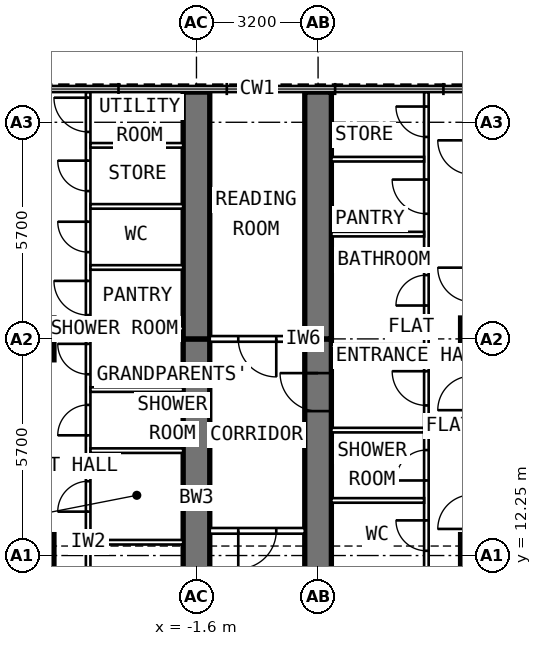
"""IFC4 building model, lengths in metres.
Left out: names, types, materials, properties, quantities, classifications, styles, units other than length and angle.
Written with IfcOpenShell. Run it as: python <this file> out.ifc"""

import sys

from ifc_helpers import new_model, si_unit, direction, frame, frame_2d, origin, origin_2d, place, context, subcontext, project, spatial, rectangle, extrude, element, fill, save


model = new_model("IFC4")
c1 = context("Model", 3, precision=1e-05, world=origin(), true_north=direction((0.0, 1.0)))
c2 = subcontext(c1, "Body", "Model", "MODEL_VIEW")
j1 = project(units=[si_unit("LENGTHUNIT", "METRE"), si_unit("PLANEANGLEUNIT", "RADIAN")], contexts=[c1])
p1 = place(None, origin())
s1 = spatial("IfcSite", under=j1, at=p1, CompositionType="ELEMENT")
p2 = place(p1, origin())
s2 = spatial("IfcBuilding", under=s1, at=p2, CompositionType="ELEMENT")
p3 = place(p2, frame((0.0, 0.0, 219.0)))
s3 = spatial("IfcBuildingStorey", under=s2, at=p3, CompositionType="ELEMENT", Elevation=219.0)
for number, where, z_axis, x_axis in (
    (1, (-5.9, 12.25, 0.0), (0.0, 0.0, 1.0), (0.0, 1.0, 0.0)),
    (2, (-5.9, 17.95, 0.0), (0.0, 0.0, 1.0), (0.0, 1.0, 0.0)),
    (3, (5.9, 12.25, 0.0), (0.0, 0.0, 1.0), (0.0, 1.0, 0.0)),
    (4, (5.9, 17.95, 0.0), (0.0, 0.0, 1.0), (0.0, 1.0, 0.0)),
):
    element("IfcColumn", number, at=place(p3, frame(where, z_axis=z_axis, x_axis=x_axis)), inside=s3, PredefinedType="COLUMN", context=c2, shape_type="SweptSolid", body=[
        extrude(rectangle(XDim=1.1, YDim=1.1, at=origin_2d()), origin(), (0.0, 0.0, 1.0), 3.6),
    ])
p4 = place(p3, frame((-1.6, 9.6, 0.0), z_axis=(0.0, 0.0, 1.0), x_axis=(0.0, 1.0, 0.0)))
e5 = element("IfcWall", 5, at=p4, inside=s3, PredefinedType="SHEAR", context=c2, shape_type="SweptSolid", body=[
    extrude(rectangle(XDim=8.35, YDim=0.7, at=frame_2d((4.175, 0.0))), origin(), (0.0, 0.0, 1.0), 3.6),
])
p5 = place(p4, frame((1.3, 0.0, 0.0)))
e6 = element("IfcOpeningElement", 6, at=p5, cuts=e5, PredefinedType="OPENING", context=c2, shape_type="SweptSolid", body=[
    extrude(rectangle(XDim=1.0, YDim=2.1, at=frame_2d((0.5, 1.05))), frame((0.0, 0.362, 0.0), z_axis=(0.0, -1.0, 0.0), x_axis=(1.0, 0.0, 0.0)), (0.0, 0.0, 1.0), 0.724),
])
p6 = place(p3, frame((-1.6, 17.95, 0.0), z_axis=(0.0, 0.0, 1.0), x_axis=(0.0, 1.0, 0.0)))
e7 = element("IfcWall", 7, at=p6, inside=s3, PredefinedType="SHEAR", context=c2, shape_type="SweptSolid", body=[
    extrude(rectangle(XDim=6.495, YDim=0.7, at=frame_2d((3.248, 0.0))), origin(), (0.0, 0.0, 1.0), 3.6),
])
p7 = place(p3, frame((1.6, 9.6, 0.0), z_axis=(0.0, 0.0, 1.0), x_axis=(0.0, 1.0, 0.0)))
e8 = element("IfcWall", 8, at=p7, inside=s3, PredefinedType="SHEAR", context=c2, shape_type="SweptSolid", body=[
    extrude(rectangle(XDim=8.35, YDim=0.7, at=frame_2d((4.175, 0.0))), origin(), (0.0, 0.0, 1.0), 3.6),
])
p8 = place(p7, frame((6.45, 0.0, 0.0)))
e9 = element("IfcOpeningElement", 9, at=p8, cuts=e8, PredefinedType="OPENING", context=c2, shape_type="SweptSolid", body=[
    extrude(rectangle(XDim=1.0, YDim=2.1, at=frame_2d((0.5, 1.05))), frame((0.0, 0.362, 0.0), z_axis=(0.0, -1.0, 0.0), x_axis=(1.0, 0.0, 0.0)), (0.0, 0.0, 1.0), 0.724),
])
p9 = place(p3, frame((1.6, 17.95, 0.0), z_axis=(0.0, 0.0, 1.0), x_axis=(0.0, 1.0, 0.0)))
e10 = element("IfcWall", 10, at=p9, inside=s3, PredefinedType="SHEAR", context=c2, shape_type="SweptSolid", body=[
    extrude(rectangle(XDim=6.495, YDim=0.7, at=frame_2d((3.248, 0.0))), origin(), (0.0, 0.0, 1.0), 3.6),
])
p10 = place(p3, frame((-4.45, 9.925, 0.0), z_axis=(0.0, 0.0, 1.0), x_axis=(0.0, 1.0, 0.0)))
e11 = element("IfcWall", 11, at=p10, inside=s3, PredefinedType="PARTITIONING", context=c2, shape_type="SweptSolid", body=[
    extrude(rectangle(XDim=14.52, YDim=0.12, at=frame_2d((7.26, 0.0))), origin(), (0.0, 0.0, 1.0), 3.35),
])
p11 = place(p10, frame((0.925, 0.0, 0.0)))
e12 = element("IfcOpeningElement", 12, at=p11, cuts=e11, PredefinedType="OPENING", context=c2, shape_type="SweptSolid", body=[
    extrude(rectangle(XDim=0.9, YDim=2.1, at=frame_2d((0.45, 1.05))), frame((0.0, 0.072, 0.0), z_axis=(0.0, -1.0, 0.0), x_axis=(1.0, 0.0, 0.0)), (0.0, 0.0, 1.0), 0.144),
])
p12 = place(p10, frame((3.48, 0.0, 0.0)))
e13 = element("IfcOpeningElement", 13, at=p12, cuts=e11, PredefinedType="OPENING", context=c2, shape_type="SweptSolid", body=[
    extrude(rectangle(XDim=0.8, YDim=2.1, at=frame_2d((0.4, 1.05))), frame((0.0, 0.072, 0.0), z_axis=(0.0, -1.0, 0.0), x_axis=(1.0, 0.0, 0.0)), (0.0, 0.0, 1.0), 0.144),
])
p13 = place(p10, frame((5.488, 0.0, 0.0)))
e14 = element("IfcOpeningElement", 14, at=p13, cuts=e11, PredefinedType="OPENING", context=c2, shape_type="SweptSolid", body=[
    extrude(rectangle(XDim=0.8, YDim=2.1, at=frame_2d((0.4, 1.05))), frame((0.0, 0.072, 0.0), z_axis=(0.0, -1.0, 0.0), x_axis=(1.0, 0.0, 0.0)), (0.0, 0.0, 1.0), 0.144),
])
p14 = place(p10, frame((7.095, 0.0, 0.0)))
e15 = element("IfcOpeningElement", 15, at=p14, cuts=e11, PredefinedType="OPENING", context=c2, shape_type="SweptSolid", body=[
    extrude(rectangle(XDim=0.8, YDim=2.1, at=frame_2d((0.4, 1.05))), frame((0.0, 0.072, 0.0), z_axis=(0.0, -1.0, 0.0), x_axis=(1.0, 0.0, 0.0)), (0.0, 0.0, 1.0), 0.144),
])
p15 = place(p10, frame((8.652, 0.0, 0.0)))
e16 = element("IfcOpeningElement", 16, at=p15, cuts=e11, PredefinedType="OPENING", context=c2, shape_type="SweptSolid", body=[
    extrude(rectangle(XDim=0.9, YDim=2.1, at=frame_2d((0.45, 1.05))), frame((0.0, 0.072, 0.0), z_axis=(0.0, -1.0, 0.0), x_axis=(1.0, 0.0, 0.0)), (0.0, 0.0, 1.0), 0.144),
])
p16 = place(p10, frame((10.308, 0.0, 0.0)))
e17 = element("IfcOpeningElement", 17, at=p16, cuts=e11, PredefinedType="OPENING", context=c2, shape_type="SweptSolid", body=[
    extrude(rectangle(XDim=0.8, YDim=2.1, at=frame_2d((0.4, 1.05))), frame((0.0, 0.072, 0.0), z_axis=(0.0, -1.0, 0.0), x_axis=(1.0, 0.0, 0.0)), (0.0, 0.0, 1.0), 0.144),
])
p17 = place(p10, frame((11.915, 0.0, 0.0)))
e18 = element("IfcOpeningElement", 18, at=p17, cuts=e11, PredefinedType="OPENING", context=c2, shape_type="SweptSolid", body=[
    extrude(rectangle(XDim=0.8, YDim=2.1, at=frame_2d((0.4, 1.05))), frame((0.0, 0.072, 0.0), z_axis=(0.0, -1.0, 0.0), x_axis=(1.0, 0.0, 0.0)), (0.0, 0.0, 1.0), 0.144),
])
p18 = place(p10, frame((13.472, 0.0, 0.0)))
e19 = element("IfcOpeningElement", 19, at=p18, cuts=e11, PredefinedType="OPENING", context=c2, shape_type="SweptSolid", body=[
    extrude(rectangle(XDim=0.9, YDim=2.1, at=frame_2d((0.45, 1.05))), frame((0.0, 0.072, 0.0), z_axis=(0.0, -1.0, 0.0), x_axis=(1.0, 0.0, 0.0)), (0.0, 0.0, 1.0), 0.144),
])
p19 = place(p3, frame((-1.95, 12.6, 0.0), z_axis=(0.0, 0.0, 1.0), x_axis=(-1.0, 0.0, 0.0)))
e20 = element("IfcWall", 20, at=p19, inside=s3, PredefinedType="PARTITIONING", context=c2, shape_type="SweptSolid", body=[
    extrude(rectangle(XDim=2.44, YDim=0.12, at=frame_2d((1.22, 0.0))), origin(), (0.0, 0.0, 1.0), 2.45),
])
for number, where, z_axis, x_axis in (
    (21, (-1.95, 15.01, 0.0), (0.0, 0.0, 1.0), (-1.0, 0.0, 0.0)),
    (22, (-1.95, 16.617, 0.0), (0.0, 0.0, 1.0), (-1.0, 0.0, 0.0)),
):
    element("IfcWall", number, at=place(p3, frame(where, z_axis=z_axis, x_axis=x_axis)), inside=s3, PredefinedType="PARTITIONING", context=c2, shape_type="SweptSolid", body=[
        extrude(rectangle(XDim=2.44, YDim=0.12, at=frame_2d((1.22, 0.0))), origin(), (0.0, 0.0, 1.0), 3.35),
    ])
p20 = place(p3, frame((-1.95, 18.223, 0.0), z_axis=(0.0, 0.0, 1.0), x_axis=(-1.0, 0.0, 0.0)))
e23 = element("IfcWall", 23, at=p20, inside=s3, PredefinedType="PARTITIONING", context=c2, shape_type="SweptSolid", body=[
    extrude(rectangle(XDim=2.44, YDim=0.12, at=frame_2d((1.22, 0.0))), origin(), (0.0, 0.0, 1.0), 2.45),
])
for number, where, z_axis, x_axis in (
    (24, (-1.95, 19.83, 0.0), (0.0, 0.0, 1.0), (-1.0, 0.0, 0.0)),
    (25, (-1.95, 21.437, 0.0), (0.0, 0.0, 1.0), (-1.0, 0.0, 0.0)),
    (26, (-1.95, 23.043, 0.0), (0.0, 0.0, 1.0), (-1.0, 0.0, 0.0)),
):
    element("IfcWall", number, at=place(p3, frame(where, z_axis=z_axis, x_axis=x_axis)), inside=s3, PredefinedType="PARTITIONING", context=c2, shape_type="SweptSolid", body=[
        extrude(rectangle(XDim=2.44, YDim=0.12, at=frame_2d((1.22, 0.0))), origin(), (0.0, 0.0, 1.0), 3.35),
    ])
p21 = place(p3, frame((4.45, 9.925, 0.0), z_axis=(0.0, 0.0, 1.0), x_axis=(0.0, 1.0, 0.0)))
e27 = element("IfcWall", 27, at=p21, inside=s3, PredefinedType="PARTITIONING", context=c2, shape_type="SweptSolid", body=[
    extrude(rectangle(XDim=14.52, YDim=0.12, at=frame_2d((7.26, 0.0))), origin(), (0.0, 0.0, 1.0), 3.35),
])
p22 = place(p21, frame((0.55, 0.0, 0.0)))
e28 = element("IfcOpeningElement", 28, at=p22, cuts=e27, PredefinedType="OPENING", context=c2, shape_type="SweptSolid", body=[
    extrude(rectangle(XDim=0.9, YDim=2.1, at=frame_2d((0.45, 1.05))), frame((0.0, 0.072, 0.0), z_axis=(0.0, -1.0, 0.0), x_axis=(1.0, 0.0, 0.0)), (0.0, 0.0, 1.0), 0.144),
])
p23 = place(p21, frame((2.45, 0.0, 0.0)))
e29 = element("IfcOpeningElement", 29, at=p23, cuts=e27, PredefinedType="OPENING", context=c2, shape_type="SweptSolid", body=[
    extrude(rectangle(XDim=0.8, YDim=2.1, at=frame_2d((0.4, 1.05))), frame((0.0, 0.072, 0.0), z_axis=(0.0, -1.0, 0.0), x_axis=(1.0, 0.0, 0.0)), (0.0, 0.0, 1.0), 0.144),
])
p24 = place(p21, frame((4.3, 0.0, 0.0)))
e30 = element("IfcOpeningElement", 30, at=p24, cuts=e27, PredefinedType="OPENING", context=c2, shape_type="SweptSolid", body=[
    extrude(rectangle(XDim=0.8, YDim=2.1, at=frame_2d((0.4, 1.05))), frame((0.0, 0.072, 0.0), z_axis=(0.0, -1.0, 0.0), x_axis=(1.0, 0.0, 0.0)), (0.0, 0.0, 1.0), 0.144),
])
p25 = place(p21, frame((6.275, 0.0, 0.0)))
e31 = element("IfcOpeningElement", 31, at=p25, cuts=e27, PredefinedType="OPENING", context=c2, shape_type="SweptSolid", body=[
    extrude(rectangle(XDim=0.9, YDim=2.1, at=frame_2d((0.45, 1.05))), frame((0.0, 0.072, 0.0), z_axis=(0.0, -1.0, 0.0), x_axis=(1.0, 0.0, 0.0)), (0.0, 0.0, 1.0), 0.144),
])
p26 = place(p21, frame((8.904, 0.0, 0.0)))
e32 = element("IfcOpeningElement", 32, at=p26, cuts=e27, PredefinedType="OPENING", context=c2, shape_type="SweptSolid", body=[
    extrude(rectangle(XDim=0.8, YDim=2.1, at=frame_2d((0.4, 1.05))), frame((0.0, 0.072, 0.0), z_axis=(0.0, -1.0, 0.0), x_axis=(1.0, 0.0, 0.0)), (0.0, 0.0, 1.0), 0.144),
])
p27 = place(p21, frame((11.318, 0.0, 0.0)))
e33 = element("IfcOpeningElement", 33, at=p27, cuts=e27, PredefinedType="OPENING", context=c2, shape_type="SweptSolid", body=[
    extrude(rectangle(XDim=0.9, YDim=2.1, at=frame_2d((0.45, 1.05))), frame((0.0, 0.072, 0.0), z_axis=(0.0, -1.0, 0.0), x_axis=(1.0, 0.0, 0.0)), (0.0, 0.0, 1.0), 0.144),
])
p28 = place(p21, frame((13.339, 0.0, 0.0)))
e34 = element("IfcOpeningElement", 34, at=p28, cuts=e27, PredefinedType="OPENING", context=c2, shape_type="SweptSolid", body=[
    extrude(rectangle(XDim=0.8, YDim=2.1, at=frame_2d((0.4, 1.05))), frame((0.0, 0.072, 0.0), z_axis=(0.0, -1.0, 0.0), x_axis=(1.0, 0.0, 0.0)), (0.0, 0.0, 1.0), 0.144),
])
for number, where, z_axis, x_axis in (
    (35, (1.95, 13.7, 0.0), (0.0, 0.0, 1.0), (1.0, 0.0, 0.0)),
    (36, (1.95, 15.55, 0.0), (0.0, 0.0, 1.0), (1.0, 0.0, 0.0)),
):
    element("IfcWall", number, at=place(p3, frame(where, z_axis=z_axis, x_axis=x_axis)), inside=s3, PredefinedType="PARTITIONING", context=c2, shape_type="SweptSolid", body=[
        extrude(rectangle(XDim=2.44, YDim=0.12, at=frame_2d((1.22, 0.0))), origin(), (0.0, 0.0, 1.0), 3.35),
    ])
p29 = place(p3, frame((1.95, 17.75, 0.0), z_axis=(0.0, 0.0, 1.0), x_axis=(1.0, 0.0, 0.0)))
e37 = element("IfcWall", 37, at=p29, inside=s3, PredefinedType="PARTITIONING", context=c2, shape_type="SweptSolid", body=[
    extrude(rectangle(XDim=2.44, YDim=0.12, at=frame_2d((1.22, 0.0))), origin(), (0.0, 0.0, 1.0), 2.45),
])
for number, where, z_axis, x_axis in (
    (38, (1.95, 20.707, 0.0), (0.0, 0.0, 1.0), (1.0, 0.0, 0.0)),
    (39, (1.95, 22.678, 0.0), (0.0, 0.0, 1.0), (1.0, 0.0, 0.0)),
):
    element("IfcWall", number, at=place(p3, frame(where, z_axis=z_axis, x_axis=x_axis)), inside=s3, PredefinedType="PARTITIONING", context=c2, shape_type="SweptSolid", body=[
        extrude(rectangle(XDim=2.44, YDim=0.12, at=frame_2d((1.22, 0.0))), origin(), (0.0, 0.0, 1.0), 3.35),
    ])
p30 = place(p3, frame((1.25, 17.95, 0.0), z_axis=(0.0, 0.0, 1.0), x_axis=(-1.0, 0.0, 0.0)))
e40 = element("IfcWall", 40, at=p30, inside=s3, PredefinedType="PARTITIONING", context=c2, shape_type="SweptSolid", body=[
    extrude(rectangle(XDim=2.5, YDim=0.15, at=frame_2d((1.25, 0.0))), origin(), (0.0, 0.0, 1.0), 3.35),
])
p31 = place(p30, frame((0.75, 0.0, 0.0)))
e41 = element("IfcOpeningElement", 41, at=p31, cuts=e40, PredefinedType="OPENING", context=c2, shape_type="SweptSolid", body=[
    extrude(rectangle(XDim=1.0, YDim=2.1, at=frame_2d((0.5, 1.05))), frame((0.0, 0.087, 0.0), z_axis=(0.0, -1.0, 0.0), x_axis=(1.0, 0.0, 0.0)), (0.0, 0.0, 1.0), 0.174),
])
p32 = place(p3, frame((1.25, 12.9, 0.0), z_axis=(0.0, 0.0, 1.0), x_axis=(-1.0, 0.0, 0.0)))
e42 = element("IfcWall", 42, at=p32, inside=s3, PredefinedType="PARTITIONING", context=c2, shape_type="SweptSolid", body=[
    extrude(rectangle(XDim=2.5, YDim=0.15, at=frame_2d((1.25, 0.0))), origin(), (0.0, 0.0, 1.0), 3.35),
])
p33 = place(p32, frame((0.75, 0.0, 0.0)))
e43 = element("IfcOpeningElement", 43, at=p33, cuts=e42, PredefinedType="OPENING", context=c2, shape_type="SweptSolid", body=[
    extrude(rectangle(XDim=1.0, YDim=2.1, at=frame_2d((0.5, 1.05))), frame((0.0, 0.087, 0.0), z_axis=(0.0, -1.0, 0.0), x_axis=(1.0, 0.0, 0.0)), (0.0, 0.0, 1.0), 0.174),
])
p34 = place(p12, origin())
e44 = element("IfcDoor", 44, at=p34, inside=s3, OperationType="SINGLE_SWING_LEFT", PredefinedType="DOOR", context=c2, shape_type="SweptSolid", body=[
    extrude(rectangle(XDim=0.8, YDim=2.1, at=frame_2d((0.4, 1.05))), frame((0.0, 0.025, 0.0), z_axis=(0.0, -1.0, 0.0), x_axis=(1.0, 0.0, 0.0)), (0.0, 0.0, 1.0), 0.05),
])
fill(e13, e44)
p35 = place(p13, origin())
e45 = element("IfcDoor", 45, at=p35, inside=s3, OperationType="SINGLE_SWING_LEFT", PredefinedType="DOOR", context=c2, shape_type="SweptSolid", body=[
    extrude(rectangle(XDim=0.8, YDim=2.1, at=frame_2d((0.4, 1.05))), frame((0.0, 0.025, 0.0), z_axis=(0.0, -1.0, 0.0), x_axis=(1.0, 0.0, 0.0)), (0.0, 0.0, 1.0), 0.05),
])
fill(e14, e45)
p36 = place(p14, origin())
e46 = element("IfcDoor", 46, at=p36, inside=s3, OperationType="SINGLE_SWING_RIGHT", PredefinedType="DOOR", context=c2, shape_type="SweptSolid", body=[
    extrude(rectangle(XDim=0.8, YDim=2.1, at=frame_2d((0.4, 1.05))), frame((0.0, 0.025, 0.0), z_axis=(0.0, -1.0, 0.0), x_axis=(1.0, 0.0, 0.0)), (0.0, 0.0, 1.0), 0.05),
])
fill(e15, e46)
p37 = place(p15, origin())
e47 = element("IfcDoor", 47, at=p37, inside=s3, OperationType="SINGLE_SWING_RIGHT", PredefinedType="DOOR", context=c2, shape_type="SweptSolid", body=[
    extrude(rectangle(XDim=0.9, YDim=2.1, at=frame_2d((0.45, 1.05))), frame((0.0, 0.025, 0.0), z_axis=(0.0, -1.0, 0.0), x_axis=(1.0, 0.0, 0.0)), (0.0, 0.0, 1.0), 0.05),
])
fill(e16, e47)
p38 = place(p16, origin())
e48 = element("IfcDoor", 48, at=p38, inside=s3, OperationType="SINGLE_SWING_RIGHT", PredefinedType="DOOR", context=c2, shape_type="SweptSolid", body=[
    extrude(rectangle(XDim=0.8, YDim=2.1, at=frame_2d((0.4, 1.05))), frame((0.0, 0.025, 0.0), z_axis=(0.0, -1.0, 0.0), x_axis=(1.0, 0.0, 0.0)), (0.0, 0.0, 1.0), 0.05),
])
fill(e17, e48)
p39 = place(p17, origin())
e49 = element("IfcDoor", 49, at=p39, inside=s3, OperationType="SINGLE_SWING_RIGHT", PredefinedType="DOOR", context=c2, shape_type="SweptSolid", body=[
    extrude(rectangle(XDim=0.8, YDim=2.1, at=frame_2d((0.4, 1.05))), frame((0.0, 0.025, 0.0), z_axis=(0.0, -1.0, 0.0), x_axis=(1.0, 0.0, 0.0)), (0.0, 0.0, 1.0), 0.05),
])
fill(e18, e49)
p40 = place(p18, origin())
e50 = element("IfcDoor", 50, at=p40, inside=s3, OperationType="SINGLE_SWING_RIGHT", PredefinedType="DOOR", context=c2, shape_type="SweptSolid", body=[
    extrude(rectangle(XDim=0.9, YDim=2.1, at=frame_2d((0.45, 1.05))), frame((0.0, 0.025, 0.0), z_axis=(0.0, -1.0, 0.0), x_axis=(1.0, 0.0, 0.0)), (0.0, 0.0, 1.0), 0.05),
])
fill(e19, e50)
p41 = place(p8, origin())
e51 = element("IfcDoor", 51, at=p41, inside=s3, OperationType="SINGLE_SWING_RIGHT", PredefinedType="DOOR", context=c2, shape_type="SweptSolid", body=[
    extrude(rectangle(XDim=1.0, YDim=2.1, at=frame_2d((0.5, 1.05))), frame((0.0, 0.1, 0.0), z_axis=(0.0, -1.0, 0.0), x_axis=(1.0, 0.0, 0.0)), (0.0, 0.0, 1.0), 0.2),
])
fill(e9, e51)
p42 = place(p23, origin())
e52 = element("IfcDoor", 52, at=p42, inside=s3, OperationType="SINGLE_SWING_RIGHT", PredefinedType="DOOR", context=c2, shape_type="SweptSolid", body=[
    extrude(rectangle(XDim=0.8, YDim=2.1, at=frame_2d((0.4, 1.05))), frame((0.0, 0.025, 0.0), z_axis=(0.0, -1.0, 0.0), x_axis=(1.0, 0.0, 0.0)), (0.0, 0.0, 1.0), 0.05),
])
fill(e29, e52)
p43 = place(p24, origin())
e53 = element("IfcDoor", 53, at=p43, inside=s3, OperationType="SINGLE_SWING_LEFT", PredefinedType="DOOR", context=c2, shape_type="SweptSolid", body=[
    extrude(rectangle(XDim=0.8, YDim=2.1, at=frame_2d((0.4, 1.05))), frame((0.0, 0.025, 0.0), z_axis=(0.0, -1.0, 0.0), x_axis=(1.0, 0.0, 0.0)), (0.0, 0.0, 1.0), 0.05),
])
fill(e30, e53)
p44 = place(p25, origin())
e54 = element("IfcDoor", 54, at=p44, inside=s3, OperationType="SINGLE_SWING_RIGHT", PredefinedType="DOOR", context=c2, shape_type="SweptSolid", body=[
    extrude(rectangle(XDim=0.9, YDim=2.1, at=frame_2d((0.45, 1.05))), frame((0.0, 0.025, 0.0), z_axis=(0.0, -1.0, 0.0), x_axis=(1.0, 0.0, 0.0)), (0.0, 0.0, 1.0), 0.05),
])
fill(e31, e54)
p45 = place(p26, origin())
e55 = element("IfcDoor", 55, at=p45, inside=s3, OperationType="SINGLE_SWING_LEFT", PredefinedType="DOOR", context=c2, shape_type="SweptSolid", body=[
    extrude(rectangle(XDim=0.8, YDim=2.1, at=frame_2d((0.4, 1.05))), frame((0.0, 0.025, 0.0), z_axis=(0.0, -1.0, 0.0), x_axis=(1.0, 0.0, 0.0)), (0.0, 0.0, 1.0), 0.05),
])
fill(e32, e55)
p46 = place(p27, origin())
e56 = element("IfcDoor", 56, at=p46, inside=s3, OperationType="SINGLE_SWING_RIGHT", PredefinedType="DOOR", context=c2, shape_type="SweptSolid", body=[
    extrude(rectangle(XDim=0.9, YDim=2.1, at=frame_2d((0.45, 1.05))), frame((0.0, 0.025, 0.0), z_axis=(0.0, -1.0, 0.0), x_axis=(1.0, 0.0, 0.0)), (0.0, 0.0, 1.0), 0.05),
])
fill(e33, e56)
p47 = place(p28, origin())
e57 = element("IfcDoor", 57, at=p47, inside=s3, OperationType="SINGLE_SWING_RIGHT", PredefinedType="DOOR", context=c2, shape_type="SweptSolid", body=[
    extrude(rectangle(XDim=0.8, YDim=2.1, at=frame_2d((0.4, 1.05))), frame((0.0, 0.025, 0.0), z_axis=(0.0, -1.0, 0.0), x_axis=(1.0, 0.0, 0.0)), (0.0, 0.0, 1.0), 0.05),
])
fill(e34, e57)
p48 = place(p31, origin())
e58 = element("IfcDoor", 58, at=p48, inside=s3, OperationType="SINGLE_SWING_LEFT", PredefinedType="DOOR", context=c2, shape_type="SweptSolid", body=[
    extrude(rectangle(XDim=1.0, YDim=2.1, at=frame_2d((0.5, 1.05))), frame((0.0, 0.025, 0.0), z_axis=(0.0, -1.0, 0.0), x_axis=(1.0, 0.0, 0.0)), (0.0, 0.0, 1.0), 0.05),
])
fill(e41, e58)
p49 = place(p33, origin())
e59 = element("IfcDoor", 59, at=p49, inside=s3, OperationType="SINGLE_SWING_RIGHT", PredefinedType="DOOR", context=c2, shape_type="SweptSolid", body=[
    extrude(rectangle(XDim=1.0, YDim=2.1, at=frame_2d((0.5, 1.05))), frame((0.0, 0.025, 0.0), z_axis=(0.0, -1.0, 0.0), x_axis=(1.0, 0.0, 0.0)), (0.0, 0.0, 1.0), 0.05),
])
fill(e43, e59)
save(model, sys.argv[1])
